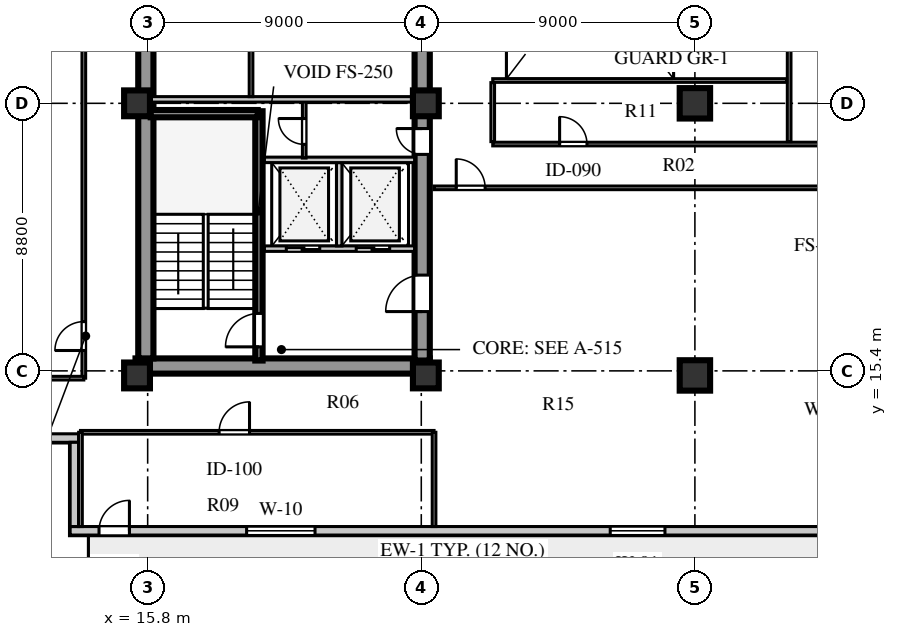
"""IFC4 building model, lengths in metres.
Left out: names, types, materials, properties, quantities, classifications, styles, units other than length and angle.
Written with IfcOpenShell. Run it as: python <this file> out.ifc"""

import sys

from ifc_helpers import new_model, si_unit, direction, frame, frame_2d, origin, origin_2d, place, context, subcontext, project, spatial, rectangle, extrude, element, fill, save


model = new_model("IFC4")
c1 = context("Model", 3, precision=1e-05, world=origin(), true_north=direction((0.0, 1.0)))
c2 = subcontext(c1, "Body", "Model", "MODEL_VIEW")
j1 = project(units=[si_unit("LENGTHUNIT", "METRE"), si_unit("PLANEANGLEUNIT", "RADIAN")], contexts=[c1])
p1 = place(None, origin())
s1 = spatial("IfcSite", under=j1, at=p1, CompositionType="ELEMENT")
p2 = place(p1, origin())
s2 = spatial("IfcBuilding", under=s1, at=p2, CompositionType="ELEMENT")
p3 = place(p2, frame((0.0, 0.0, 111.7)))
s3 = spatial("IfcBuildingStorey", under=s2, at=p3, CompositionType="ELEMENT", Elevation=111.7)
p4 = place(p3, frame((15.4, 15.56, 0.0), z_axis=(0.0, 0.0, 1.0), x_axis=(1.0, 0.0, 0.0)))
e1 = element("IfcWall", 1, at=p4, inside=s3, PredefinedType="SHEAR", context=c2, shape_type="SweptSolid", body=[
    extrude(rectangle(XDim=9.68, YDim=0.5, at=frame_2d((4.84, 0.0))), origin(), (0.0, 0.0, 1.0), 3.6),
])
p5 = place(p3, frame((15.74, 15.81, 0.0), z_axis=(0.0, 0.0, 1.0), x_axis=(0.0, 1.0, 0.0)))
e2 = element("IfcWall", 2, at=p5, inside=s3, PredefinedType="SHEAR", context=c2, shape_type="SweptSolid", body=[
    extrude(rectangle(XDim=25.63, YDim=0.5, at=frame_2d((12.815, 0.0))), origin(), (0.0, 0.0, 1.0), 3.6),
])
p6 = place(p3, frame((24.83, 15.74, 0.0), z_axis=(0.0, 0.0, 1.0), x_axis=(0.0, 1.0, 0.0)))
e3 = element("IfcWall", 3, at=p6, inside=s3, PredefinedType="SHEAR", context=c2, shape_type="SweptSolid", body=[
    extrude(rectangle(XDim=25.76, YDim=0.5, at=frame_2d((12.88, 0.0))), origin(), (0.0, 0.0, 1.0), 3.6),
])
p7 = place(p6, frame((1.61, 0.0, 0.0)))
e4 = element("IfcOpeningElement", 4, at=p7, cuts=e3, PredefinedType="OPENING", context=c2, shape_type="SweptSolid", body=[
    extrude(rectangle(XDim=1.2, YDim=2.1, at=frame_2d((0.6, 1.05))), frame((0.0, 0.26, 0.0), z_axis=(0.0, -1.0, 0.0), x_axis=(1.0, 0.0, 0.0)), (0.0, 0.0, 1.0), 0.52),
])
p8 = place(p6, frame((6.78, 0.0, 0.0)))
e5 = element("IfcOpeningElement", 5, at=p8, cuts=e3, PredefinedType="OPENING", context=c2, shape_type="SweptSolid", body=[
    extrude(rectangle(XDim=0.85, YDim=2.06, at=frame_2d((0.425, 1.03))), frame((0.0, 0.26, 0.0), z_axis=(0.0, -1.0, 0.0), x_axis=(1.0, 0.0, 0.0)), (0.0, 0.0, 1.0), 0.52),
])
p9 = place(p6, frame((12.11, 0.0, 0.0)))
e6 = element("IfcOpeningElement", 6, at=p9, cuts=e3, PredefinedType="OPENING", context=c2, shape_type="SweptSolid", body=[
    extrude(rectangle(XDim=1.5, YDim=2.12, at=frame_2d((0.75, 1.06))), frame((0.0, 0.26, 0.0), z_axis=(0.0, -1.0, 0.0), x_axis=(1.0, 0.0, 0.0)), (0.0, 0.0, 1.0), 0.52),
])
p10 = place(p6, frame((20.11, 0.0, 0.0)))
e7 = element("IfcOpeningElement", 7, at=p10, cuts=e3, PredefinedType="OPENING", context=c2, shape_type="SweptSolid", body=[
    extrude(rectangle(XDim=1.2, YDim=2.12, at=frame_2d((0.6, 1.06))), frame((0.0, 0.26, 0.0), z_axis=(0.0, -1.0, 0.0), x_axis=(1.0, 0.0, 0.0)), (0.0, 0.0, 1.0), 0.52),
])
p11 = place(p6, frame((24.01, 0.0, 0.0)))
e8 = element("IfcOpeningElement", 8, at=p11, cuts=e3, PredefinedType="OPENING", context=c2, shape_type="SweptSolid", body=[
    extrude(rectangle(XDim=0.95, YDim=2.1, at=frame_2d((0.475, 1.05))), frame((0.0, 0.26, 0.0), z_axis=(0.0, -1.0, 0.0), x_axis=(1.0, 0.0, 0.0)), (0.0, 0.0, 1.0), 0.52),
])
for number, where, z_axis, x_axis in (
    (9, (15.45, 15.25, 0.0), (0.0, 0.0, 1.0), (1.0, 0.0, 0.0)),
    (10, (15.45, 24.2, 0.0), (0.0, 0.0, 1.0), (1.0, 0.0, 0.0)),
    (11, (24.95, 15.25, 0.0), (0.0, 0.0, 1.0), (1.0, 0.0, 0.0)),
    (12, (24.95, 24.2, 0.0), (0.0, 0.0, 1.0), (1.0, 0.0, 0.0)),
):
    element("IfcColumn", number, at=place(p3, frame(where, z_axis=z_axis, x_axis=x_axis)), inside=s3, PredefinedType="COLUMN", context=c2, shape_type="SweptSolid", body=[
        extrude(rectangle(XDim=0.85, YDim=0.85, at=origin_2d()), origin(), (0.0, 0.0, 1.0), 3.6),
    ])
for number, where, z_axis, x_axis in (
    (13, (33.8, 15.25, 0.0), (0.0, 0.0, 1.0), (1.0, 0.0, 0.0)),
    (14, (33.8, 24.2, 0.0), (0.0, 0.0, 1.0), (1.0, 0.0, 0.0)),
):
    element("IfcColumn", number, at=place(p3, frame(where, z_axis=z_axis, x_axis=x_axis)), inside=s3, PredefinedType="COLUMN", context=c2, shape_type="SweptSolid", body=[
        extrude(rectangle(XDim=1.0, YDim=1.0, at=origin_2d()), origin(), (0.0, 0.0, 1.0), 3.6),
    ])
p12 = place(p3, frame((13.25, 10.14, 0.0), z_axis=(0.0, 0.0, 1.0), x_axis=(1.0, 0.0, 0.0)))
e15 = element("IfcWall", 15, at=p12, inside=s3, PredefinedType="STANDARD", context=c2, shape_type="SweptSolid", body=[
    extrude(rectangle(XDim=32.1, YDim=0.28, at=frame_2d((16.05, 0.0))), origin(), (0.0, 0.0, 1.0), 3.6),
])
p13 = place(p12, frame((0.95, 0.0, 0.0)))
e16 = element("IfcOpeningElement", 16, at=p13, cuts=e15, PredefinedType="OPENING", context=c2, shape_type="SweptSolid", body=[
    extrude(rectangle(XDim=1.0, YDim=2.05, at=frame_2d((0.5, 1.025))), frame((0.0, 0.15, 0.0), z_axis=(0.0, -1.0, 0.0), x_axis=(1.0, 0.0, 0.0)), (0.0, 0.0, 1.0), 0.3),
])
p14 = place(p12, frame((5.805, 0.0, 0.8)))
e17 = element("IfcOpeningElement", 17, at=p14, cuts=e15, PredefinedType="OPENING", context=c2, shape_type="SweptSolid", body=[
    extrude(rectangle(XDim=2.25, YDim=2.0, at=frame_2d((1.125, 1.0))), frame((0.0, 0.15, 0.0), z_axis=(0.0, -1.0, 0.0), x_axis=(1.0, 0.0, 0.0)), (0.0, 0.0, 1.0), 0.3),
])
p15 = place(p12, frame((17.765, 0.0, 0.8)))
e18 = element("IfcOpeningElement", 18, at=p15, cuts=e15, PredefinedType="OPENING", context=c2, shape_type="SweptSolid", body=[
    extrude(rectangle(XDim=1.8, YDim=2.0, at=frame_2d((0.9, 1.0))), frame((0.0, 0.15, 0.0), z_axis=(0.0, -1.0, 0.0), x_axis=(1.0, 0.0, 0.0)), (0.0, 0.0, 1.0), 0.3),
])
p16 = place(p12, frame((25.865, 0.0, 0.8)))
e19 = element("IfcOpeningElement", 19, at=p16, cuts=e15, PredefinedType="OPENING", context=c2, shape_type="SweptSolid", body=[
    extrude(rectangle(XDim=1.2, YDim=1.75, at=frame_2d((0.6, 0.875))), frame((0.0, 0.15, 0.0), z_axis=(0.0, -1.0, 0.0), x_axis=(1.0, 0.0, 0.0)), (0.0, 0.0, 1.0), 0.3),
])
p17 = place(p12, frame((29.18, 0.0, 0.8)))
e20 = element("IfcOpeningElement", 20, at=p17, cuts=e15, PredefinedType="OPENING", context=c2, shape_type="SweptSolid", body=[
    extrude(rectangle(XDim=1.2, YDim=1.75, at=frame_2d((0.6, 0.875))), frame((0.0, 0.15, 0.0), z_axis=(0.0, -1.0, 0.0), x_axis=(1.0, 0.0, 0.0)), (0.0, 0.0, 1.0), 0.3),
])
p18 = place(p3, frame((10.2, 13.19, 0.0), z_axis=(0.0, 0.0, 1.0), x_axis=(1.0, 0.0, 0.0)))
e21 = element("IfcWall", 21, at=p18, inside=s3, PredefinedType="STANDARD", context=c2, shape_type="SweptSolid", body=[
    extrude(rectangle(XDim=3.33, YDim=0.28, at=frame_2d((1.665, 0.0))), origin(), (0.0, 0.0, 1.0), 3.6),
])
p19 = place(p3, frame((13.39, 13.05, 0.0), z_axis=(0.0, 0.0, 1.0), x_axis=(0.0, -1.0, 0.0)))
e22 = element("IfcWall", 22, at=p19, inside=s3, PredefinedType="STANDARD", context=c2, shape_type="SweptSolid", body=[
    extrude(rectangle(XDim=2.77, YDim=0.28, at=frame_2d((1.385, 0.0))), origin(), (0.0, 0.0, 1.0), 3.6),
])
p20 = place(p3, frame((19.46, 15.74, 0.0), z_axis=(0.0, 0.0, 1.0), x_axis=(0.0, 1.0, 0.0)))
e23 = element("IfcWall", 23, at=p20, inside=s3, PredefinedType="SHEAR", context=c2, shape_type="SweptSolid", body=[
    extrude(rectangle(XDim=8.2, YDim=0.24, at=frame_2d((4.1, 0.0))), origin(), (0.0, 0.0, 1.0), 3.85),
])
p21 = place(p20, frame((0.45, 0.0, 0.0)))
e24 = element("IfcOpeningElement", 24, at=p21, cuts=e23, PredefinedType="OPENING", context=c2, shape_type="SweptSolid", body=[
    extrude(rectangle(XDim=1.1, YDim=2.1, at=frame_2d((0.55, 1.05))), frame((0.0, 0.13, 0.0), z_axis=(0.0, -1.0, 0.0), x_axis=(1.0, 0.0, 0.0)), (0.0, 0.0, 1.0), 0.26),
])
p22 = place(p3, frame((15.9, 23.86, 0.0), z_axis=(0.0, 0.0, 1.0), x_axis=(1.0, 0.0, 0.0)))
e25 = element("IfcWall", 25, at=p22, inside=s3, PredefinedType="SHEAR", context=c2, shape_type="SweptSolid", body=[
    extrude(rectangle(XDim=3.52, YDim=0.24, at=frame_2d((1.76, 0.0))), origin(), (0.0, 0.0, 1.0), 3.85),
])
p23 = place(p3, frame((19.64, 19.42, 0.0), z_axis=(0.0, 0.0, 1.0), x_axis=(1.0, 0.0, 0.0)))
e26 = element("IfcWall", 26, at=p23, inside=s3, PredefinedType="SOLIDWALL", context=c2, shape_type="SweptSolid", body=[
    extrude(rectangle(XDim=4.94, YDim=0.18, at=frame_2d((2.47, 0.0))), origin(), (0.0, 0.0, 1.0), 3.6),
])
p24 = place(p23, frame((0.72, 0.0, 0.0)))
e27 = element("IfcOpeningElement", 27, at=p24, cuts=e26, PredefinedType="OPENING", context=c2, shape_type="SweptSolid", body=[
    extrude(rectangle(XDim=1.1, YDim=2.1, at=frame_2d((0.55, 1.05))), frame((0.0, 0.1, 0.0), z_axis=(0.0, -1.0, 0.0), x_axis=(1.0, 0.0, 0.0)), (0.0, 0.0, 1.0), 0.2),
])
p25 = place(p23, frame((3.02, 0.0, 0.0)))
e28 = element("IfcOpeningElement", 28, at=p25, cuts=e26, PredefinedType="OPENING", context=c2, shape_type="SweptSolid", body=[
    extrude(rectangle(XDim=1.1, YDim=2.1, at=frame_2d((0.55, 1.05))), frame((0.0, 0.1, 0.0), z_axis=(0.0, -1.0, 0.0), x_axis=(1.0, 0.0, 0.0)), (0.0, 0.0, 1.0), 0.2),
])
p26 = place(p3, frame((22.1, 19.51, 0.0), z_axis=(0.0, 0.0, 1.0), x_axis=(0.0, 1.0, 0.0)))
e29 = element("IfcWall", 29, at=p26, inside=s3, PredefinedType="SOLIDWALL", context=c2, shape_type="SweptSolid", body=[
    extrude(rectangle(XDim=2.74, YDim=0.18, at=frame_2d((1.37, 0.0))), origin(), (0.0, 0.0, 1.0), 3.6),
])
p27 = place(p3, frame((19.64, 22.34, 0.0), z_axis=(0.0, 0.0, 1.0), x_axis=(1.0, 0.0, 0.0)))
e30 = element("IfcWall", 30, at=p27, inside=s3, PredefinedType="SOLIDWALL", context=c2, shape_type="SweptSolid", body=[
    extrude(rectangle(XDim=4.94, YDim=0.18, at=frame_2d((2.47, 0.0))), origin(), (0.0, 0.0, 1.0), 3.6),
])
p28 = place(p3, frame((20.95, 22.4, 0.0), z_axis=(0.0, 0.0, 1.0), x_axis=(0.0, 1.0, 0.0)))
e31 = element("IfcWall", 31, at=p28, inside=s3, PredefinedType="PARTITIONING", context=c2, shape_type="SweptSolid", body=[
    extrude(rectangle(XDim=1.88, YDim=0.12, at=frame_2d((0.94, 0.0))), origin(), (0.0, 0.0, 1.0), 3.6),
])
p29 = place(p28, frame((0.45, 0.0, 0.0)))
e32 = element("IfcOpeningElement", 32, at=p29, cuts=e31, PredefinedType="OPENING", context=c2, shape_type="SweptSolid", body=[
    extrude(rectangle(XDim=0.85, YDim=2.06, at=frame_2d((0.425, 1.03))), frame((0.0, 0.07, 0.0), z_axis=(0.0, -1.0, 0.0), x_axis=(1.0, 0.0, 0.0)), (0.0, 0.0, 1.0), 0.14),
])
p30 = place(p3, frame((15.9, 24.33, 0.0), z_axis=(0.0, 0.0, 1.0), x_axis=(1.0, 0.0, 0.0)))
e33 = element("IfcWall", 33, at=p30, inside=s3, PredefinedType="SOLIDWALL", context=c2, shape_type="SweptSolid", body=[
    extrude(rectangle(XDim=8.68, YDim=0.18, at=frame_2d((4.34, 0.0))), origin(), (0.0, 0.0, 1.0), 2.95),
])
p31 = place(p3, frame((19.2, 24.42, 0.0), z_axis=(0.0, 0.0, 1.0), x_axis=(0.0, 1.0, 0.0)))
e34 = element("IfcWall", 34, at=p31, inside=s3, PredefinedType="PARTITIONING", context=c2, shape_type="SweptSolid", body=[
    extrude(rectangle(XDim=2.02, YDim=0.12, at=frame_2d((1.01, 0.0))), origin(), (0.0, 0.0, 1.0), 3.6),
])
p32 = place(p3, frame((25.22, 21.42, 0.0), z_axis=(0.0, 0.0, 1.0), x_axis=(1.0, 0.0, 0.0)))
e35 = element("IfcWall", 35, at=p32, inside=s3, PredefinedType="PARTITIONING", context=c2, shape_type="SweptSolid", body=[
    extrude(rectangle(XDim=15.6, YDim=0.12, at=frame_2d((7.8, 0.0))), origin(), (0.0, 0.0, 1.0), 3.2),
])
p33 = place(p32, frame((0.73, 0.0, 0.0)))
e36 = element("IfcOpeningElement", 36, at=p33, cuts=e35, PredefinedType="OPENING", context=c2, shape_type="SweptSolid", body=[
    extrude(rectangle(XDim=0.95, YDim=2.1, at=frame_2d((0.475, 1.05))), frame((0.0, 0.07, 0.0), z_axis=(0.0, -1.0, 0.0), x_axis=(1.0, 0.0, 0.0)), (0.0, 0.0, 1.0), 0.14),
])
p34 = place(p3, frame((27.15, 22.86, 0.0), z_axis=(0.0, 0.0, 1.0), x_axis=(1.0, 0.0, 0.0)))
e37 = element("IfcWall", 37, at=p34, inside=s3, PredefinedType="PARTITIONING", context=c2, shape_type="SweptSolid", body=[
    extrude(rectangle(XDim=13.67, YDim=0.12, at=frame_2d((6.835, 0.0))), origin(), (0.0, 0.0, 1.0), 3.6),
])
p35 = place(p34, frame((2.2, 0.0, 0.0)))
e38 = element("IfcOpeningElement", 38, at=p35, cuts=e37, PredefinedType="OPENING", context=c2, shape_type="SweptSolid", body=[
    extrude(rectangle(XDim=0.9, YDim=2.08, at=frame_2d((0.45, 1.04))), frame((0.0, 0.07, 0.0), z_axis=(0.0, -1.0, 0.0), x_axis=(1.0, 0.0, 0.0)), (0.0, 0.0, 1.0), 0.14),
])
p36 = place(p3, frame((13.7, 15.16, 0.0), z_axis=(0.0, 0.0, 1.0), x_axis=(0.0, 1.0, 0.0)))
e39 = element("IfcWall", 39, at=p36, inside=s3, PredefinedType="PARTITIONING", context=c2, shape_type="SweptSolid", body=[
    extrude(rectangle(XDim=26.88, YDim=0.12, at=frame_2d((13.44, 0.0))), origin(), (0.0, 0.0, 1.0), 3.6),
])
p37 = place(p36, frame((0.91, 0.0, 0.0)))
e40 = element("IfcOpeningElement", 40, at=p37, cuts=e39, PredefinedType="OPENING", context=c2, shape_type="SweptSolid", body=[
    extrude(rectangle(XDim=0.95, YDim=2.1, at=frame_2d((0.475, 1.05))), frame((0.0, 0.07, 0.0), z_axis=(0.0, -1.0, 0.0), x_axis=(1.0, 0.0, 0.0)), (0.0, 0.0, 1.0), 0.14),
])
p38 = place(p3, frame((10.48, 15.16, 0.0), z_axis=(0.0, 0.0, 1.0), x_axis=(1.0, 0.0, 0.0)))
e41 = element("IfcWall", 41, at=p38, inside=s3, PredefinedType="PARTITIONING", context=c2, shape_type="SweptSolid", body=[
    extrude(rectangle(XDim=3.22, YDim=0.12, at=frame_2d((1.61, 0.0))), origin(), (0.0, 0.0, 1.0), 3.1),
])
p39 = place(p3, frame((13.59, 13.38, 0.0), z_axis=(0.0, 0.0, 1.0), x_axis=(1.0, 0.0, 0.0)))
e42 = element("IfcWall", 42, at=p39, inside=s3, PredefinedType="PARTITIONING", context=c2, shape_type="SweptSolid", body=[
    extrude(rectangle(XDim=11.63, YDim=0.12, at=frame_2d((5.815, 0.0))), origin(), (0.0, 0.0, 1.0), 3.6),
])
p40 = place(p39, frame((4.56, 0.0, 0.0)))
e43 = element("IfcOpeningElement", 43, at=p40, cuts=e42, PredefinedType="OPENING", context=c2, shape_type="SweptSolid", body=[
    extrude(rectangle(XDim=1.0, YDim=2.08, at=frame_2d((0.5, 1.04))), frame((0.0, 0.07, 0.0), z_axis=(0.0, -1.0, 0.0), x_axis=(1.0, 0.0, 0.0)), (0.0, 0.0, 1.0), 0.14),
])
p41 = place(p3, frame((13.59, 10.28, 0.0), z_axis=(0.0, 0.0, 1.0), x_axis=(0.0, 1.0, 0.0)))
e44 = element("IfcWall", 44, at=p41, inside=s3, PredefinedType="PARTITIONING", context=c2, shape_type="SweptSolid", body=[
    extrude(rectangle(XDim=3.1, YDim=0.12, at=frame_2d((1.55, 0.0))), origin(), (0.0, 0.0, 1.0), 3.6),
])
p42 = place(p3, frame((25.22, 10.28, 0.0), z_axis=(0.0, 0.0, 1.0), x_axis=(0.0, 1.0, 0.0)))
e45 = element("IfcWall", 45, at=p42, inside=s3, PredefinedType="PARTITIONING", context=c2, shape_type="SweptSolid", body=[
    extrude(rectangle(XDim=3.1, YDim=0.12, at=frame_2d((1.55, 0.0))), origin(), (0.0, 0.0, 1.0), 3.1),
])
p43 = place(p3, frame((36.9, 22.94, 0.0), z_axis=(0.0, 0.0, 1.0), x_axis=(0.0, 1.0, 0.0)))
e46 = element("IfcWall", 46, at=p43, inside=s3, PredefinedType="PARTITIONING", context=c2, shape_type="SweptSolid", body=[
    extrude(rectangle(XDim=4.28, YDim=0.12, at=frame_2d((2.14, 0.0))), origin(), (0.0, 0.0, 1.0), 3.6),
])
p44 = place(p3, frame((27.15, 24.95, 0.0), z_axis=(0.0, 0.0, 1.0), x_axis=(1.0, 0.0, 0.0)))
e47 = element("IfcWall", 47, at=p44, inside=s3, PredefinedType="PARTITIONING", context=c2, shape_type="SweptSolid", body=[
    extrude(rectangle(XDim=9.67, YDim=0.12, at=frame_2d((4.835, 0.0))), origin(), (0.0, 0.0, 1.0), 3.05),
])
p45 = place(p3, frame((27.15, 22.94, 0.0), z_axis=(0.0, 0.0, 1.0), x_axis=(0.0, 1.0, 0.0)))
e48 = element("IfcWall", 48, at=p45, inside=s3, PredefinedType="PARTITIONING", context=c2, shape_type="SweptSolid", body=[
    extrude(rectangle(XDim=1.94, YDim=0.12, at=frame_2d((0.97, 0.0))), origin(), (0.0, 0.0, 1.0), 3.6),
])
p46 = place(p13, frame((1.0, 0.0, 0.0), z_axis=(0.0, 0.0, 1.0), x_axis=(-1.0, 0.0, 0.0)))
e49 = element("IfcDoor", 49, at=p46, inside=s3, OperationType="SINGLE_SWING_LEFT", PredefinedType="DOOR", context=c2, shape_type="SweptSolid", body=[
    extrude(rectangle(XDim=1.0, YDim=2.05, at=frame_2d((0.5, 1.025))), frame((0.0, 0.025, 0.0), z_axis=(0.0, -1.0, 0.0), x_axis=(1.0, 0.0, 0.0)), (0.0, 0.0, 1.0), 0.05),
])
fill(e16, e49)
p47 = place(p14, origin())
e50 = element("IfcWindow", 50, at=p47, inside=s3, PartitioningType="SINGLE_PANEL", PredefinedType="WINDOW", context=c2, shape_type="SweptSolid", body=[
    extrude(rectangle(XDim=2.25, YDim=2.0, at=frame_2d((1.125, 1.0))), frame((0.0, 0.03, 0.0), z_axis=(0.0, -1.0, 0.0), x_axis=(1.0, 0.0, 0.0)), (0.0, 0.0, 1.0), 0.06),
])
fill(e17, e50)
p48 = place(p15, origin())
e51 = element("IfcWindow", 51, at=p48, inside=s3, PartitioningType="SINGLE_PANEL", PredefinedType="WINDOW", context=c2, shape_type="SweptSolid", body=[
    extrude(rectangle(XDim=1.8, YDim=2.0, at=frame_2d((0.9, 1.0))), frame((0.0, 0.03, 0.0), z_axis=(0.0, -1.0, 0.0), x_axis=(1.0, 0.0, 0.0)), (0.0, 0.0, 1.0), 0.06),
])
fill(e18, e51)
p49 = place(p21, origin())
e52 = element("IfcDoor", 52, at=p49, inside=s3, OperationType="SINGLE_SWING_LEFT", PredefinedType="DOOR", context=c2, shape_type="SweptSolid", body=[
    extrude(rectangle(XDim=1.1, YDim=2.1, at=frame_2d((0.55, 1.05))), frame((0.0, 0.025, 0.0), z_axis=(0.0, -1.0, 0.0), x_axis=(1.0, 0.0, 0.0)), (0.0, 0.0, 1.0), 0.05),
])
fill(e24, e52)
p50 = place(p24, origin())
e53 = element("IfcDoor", 53, at=p50, inside=s3, OperationType="DOUBLE_DOOR_SLIDING", PredefinedType="DOOR", context=c2, shape_type="SweptSolid", body=[
    extrude(rectangle(XDim=1.1, YDim=2.1, at=frame_2d((0.55, 1.05))), frame((0.0, 0.025, 0.0), z_axis=(0.0, -1.0, 0.0), x_axis=(1.0, 0.0, 0.0)), (0.0, 0.0, 1.0), 0.05),
])
fill(e27, e53)
p51 = place(p25, origin())
e54 = element("IfcDoor", 54, at=p51, inside=s3, OperationType="DOUBLE_DOOR_SLIDING", PredefinedType="DOOR", context=c2, shape_type="SweptSolid", body=[
    extrude(rectangle(XDim=1.1, YDim=2.1, at=frame_2d((0.55, 1.05))), frame((0.0, 0.025, 0.0), z_axis=(0.0, -1.0, 0.0), x_axis=(1.0, 0.0, 0.0)), (0.0, 0.0, 1.0), 0.05),
])
fill(e28, e54)
p52 = place(p7, frame((1.2, 0.0, 0.0), z_axis=(0.0, 0.0, 1.0), x_axis=(-1.0, 0.0, 0.0)))
e55 = element("IfcDoor", 55, at=p52, inside=s3, OperationType="SINGLE_SWING_RIGHT", PredefinedType="DOOR", context=c2, shape_type="SweptSolid", body=[
    extrude(rectangle(XDim=1.2, YDim=2.1, at=frame_2d((0.6, 1.05))), frame((0.0, 0.025, 0.0), z_axis=(0.0, -1.0, 0.0), x_axis=(1.0, 0.0, 0.0)), (0.0, 0.0, 1.0), 0.05),
])
fill(e4, e55)
p53 = place(p29, origin())
e56 = element("IfcDoor", 56, at=p53, inside=s3, OperationType="SINGLE_SWING_RIGHT", PredefinedType="DOOR", context=c2, shape_type="SweptSolid", body=[
    extrude(rectangle(XDim=0.85, YDim=2.06, at=frame_2d((0.425, 1.03))), frame((0.0, 0.025, 0.0), z_axis=(0.0, -1.0, 0.0), x_axis=(1.0, 0.0, 0.0)), (0.0, 0.0, 1.0), 0.05),
])
fill(e32, e56)
p54 = place(p8, frame((0.85, 0.0, 0.0), z_axis=(0.0, 0.0, 1.0), x_axis=(-1.0, 0.0, 0.0)))
e57 = element("IfcDoor", 57, at=p54, inside=s3, OperationType="SINGLE_SWING_LEFT", PredefinedType="DOOR", context=c2, shape_type="SweptSolid", body=[
    extrude(rectangle(XDim=0.85, YDim=2.06, at=frame_2d((0.425, 1.03))), frame((0.0, 0.025, 0.0), z_axis=(0.0, -1.0, 0.0), x_axis=(1.0, 0.0, 0.0)), (0.0, 0.0, 1.0), 0.05),
])
fill(e5, e57)
p55 = place(p40, frame((1.0, 0.0, 0.0), z_axis=(0.0, 0.0, 1.0), x_axis=(-1.0, 0.0, 0.0)))
e58 = element("IfcDoor", 58, at=p55, inside=s3, OperationType="SINGLE_SWING_LEFT", PredefinedType="DOOR", context=c2, shape_type="SweptSolid", body=[
    extrude(rectangle(XDim=1.0, YDim=2.08, at=frame_2d((0.5, 1.04))), frame((0.0, 0.025, 0.0), z_axis=(0.0, -1.0, 0.0), x_axis=(1.0, 0.0, 0.0)), (0.0, 0.0, 1.0), 0.05),
])
fill(e43, e58)
p56 = place(p35, origin())
e59 = element("IfcDoor", 59, at=p56, inside=s3, OperationType="SINGLE_SWING_LEFT", PredefinedType="DOOR", context=c2, shape_type="SweptSolid", body=[
    extrude(rectangle(XDim=0.9, YDim=2.08, at=frame_2d((0.45, 1.04))), frame((0.0, 0.025, 0.0), z_axis=(0.0, -1.0, 0.0), x_axis=(1.0, 0.0, 0.0)), (0.0, 0.0, 1.0), 0.05),
])
fill(e38, e59)
p57 = place(p37, origin())
e60 = element("IfcDoor", 60, at=p57, inside=s3, OperationType="SINGLE_SWING_LEFT", PredefinedType="DOOR", context=c2, shape_type="SweptSolid", body=[
    extrude(rectangle(XDim=0.95, YDim=2.1, at=frame_2d((0.475, 1.05))), frame((0.0, 0.025, 0.0), z_axis=(0.0, -1.0, 0.0), x_axis=(1.0, 0.0, 0.0)), (0.0, 0.0, 1.0), 0.05),
])
fill(e40, e60)
p58 = place(p33, frame((0.95, 0.0, 0.0), z_axis=(0.0, 0.0, 1.0), x_axis=(-1.0, 0.0, 0.0)))
e61 = element("IfcDoor", 61, at=p58, inside=s3, OperationType="SINGLE_SWING_RIGHT", PredefinedType="DOOR", context=c2, shape_type="SweptSolid", body=[
    extrude(rectangle(XDim=0.95, YDim=2.1, at=frame_2d((0.475, 1.05))), frame((0.0, 0.025, 0.0), z_axis=(0.0, -1.0, 0.0), x_axis=(1.0, 0.0, 0.0)), (0.0, 0.0, 1.0), 0.05),
])
fill(e36, e61)
save(model, sys.argv[1])
